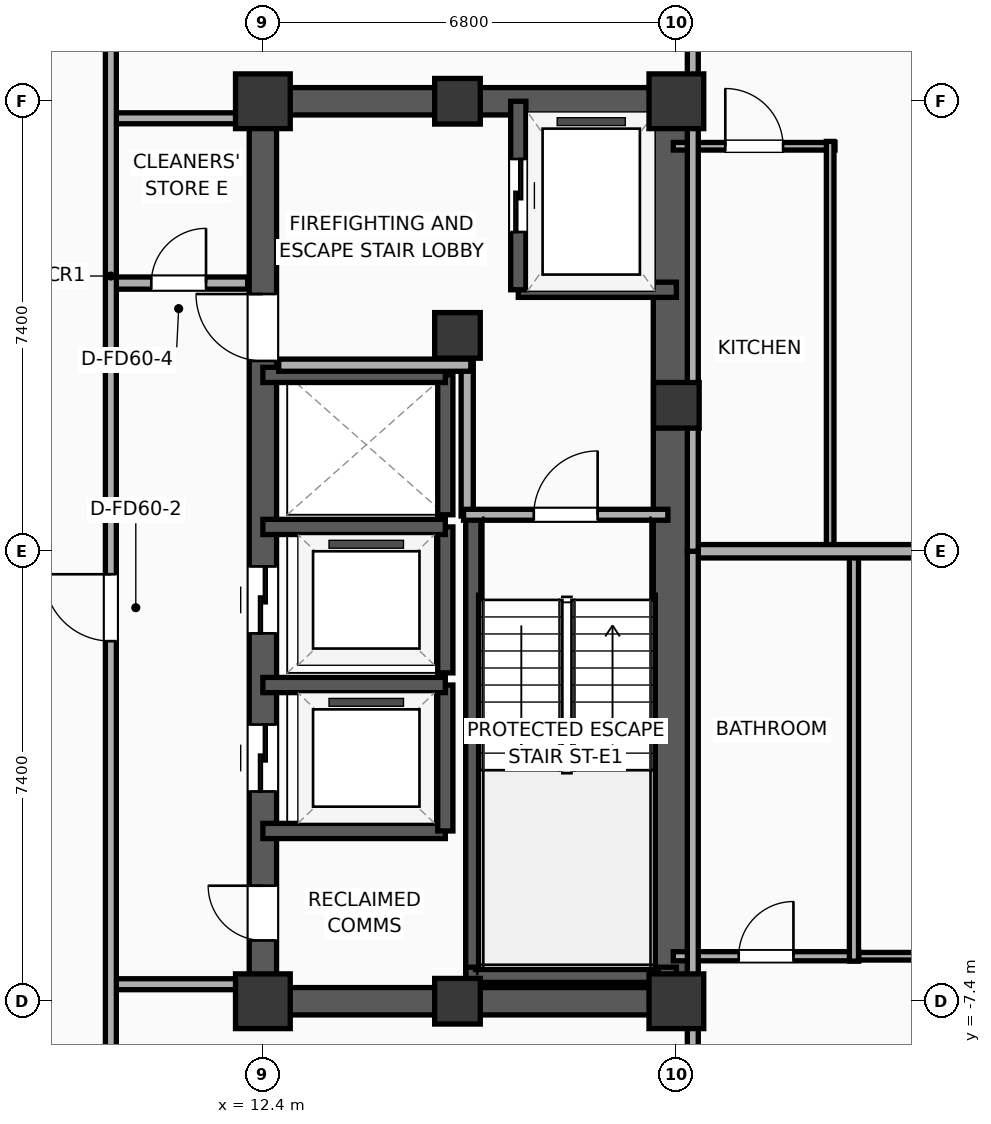
"""IFC4 building model, lengths in metres.
Left out: names, types, materials, properties, quantities, classifications, styles, units other than length and angle.
Written with IfcOpenShell. Run it as: python <this file> out.ifc"""

import sys

from ifc_helpers import new_model, si_unit, direction, frame, frame_2d, origin, origin_2d, place, context, subcontext, project, spatial, rectangle, extrude, element, fill, save


model = new_model("IFC4")
c1 = context("Model", 3, precision=1e-05, world=origin(), true_north=direction((0.0, 1.0)))
c2 = subcontext(c1, "Body", "Model", "MODEL_VIEW")
j1 = project(units=[si_unit("LENGTHUNIT", "METRE"), si_unit("PLANEANGLEUNIT", "RADIAN")], contexts=[c1])
p1 = place(None, origin())
s1 = spatial("IfcSite", under=j1, at=p1, CompositionType="ELEMENT")
p2 = place(p1, origin())
s2 = spatial("IfcBuilding", under=s1, at=p2, CompositionType="ELEMENT")
p3 = place(p2, frame((0.0, 0.0, 148.2)))
s3 = spatial("IfcBuildingStorey", under=s2, at=p3, CompositionType="ELEMENT", Elevation=148.2)
p4 = place(p3, frame((12.4, -7.4, 0.0), z_axis=(0.0, 0.0, 1.0), x_axis=(1.0, 0.0, 0.0)))
e1 = element("IfcColumn", 1, at=p4, inside=s3, PredefinedType="COLUMN", context=c2, shape_type="SweptSolid", body=[
    extrude(rectangle(XDim=0.9, YDim=0.9, at=origin_2d()), origin(), (0.0, 0.0, 1.0), 3.9),
])
p5 = place(p3, frame((15.6, 3.55, 0.0), z_axis=(0.0, 0.0, 1.0), x_axis=(1.0, 0.0, 0.0)))
e2 = element("IfcColumn", 2, at=p5, inside=s3, PredefinedType="COLUMN", context=c2, shape_type="SweptSolid", body=[
    extrude(rectangle(XDim=0.75, YDim=0.75, at=origin_2d()), origin(), (0.0, 0.0, 1.0), 3.9),
])
p6 = place(p3, frame((12.4, 7.4, 0.0), z_axis=(0.0, 0.0, 1.0), x_axis=(1.0, 0.0, 0.0)))
e3 = element("IfcColumn", 3, at=p6, inside=s3, PredefinedType="COLUMN", context=c2, shape_type="SweptSolid", body=[
    extrude(rectangle(XDim=0.9, YDim=0.9, at=origin_2d()), origin(), (0.0, 0.0, 1.0), 3.9),
])
for number, where, z_axis, x_axis in (
    (4, (15.6, -7.4, 0.0), (0.0, 0.0, 1.0), (1.0, 0.0, 0.0)),
    (5, (15.6, 7.4, 0.0), (0.0, 0.0, 1.0), (1.0, 0.0, 0.0)),
):
    element("IfcColumn", number, at=place(p3, frame(where, z_axis=z_axis, x_axis=x_axis)), inside=s3, PredefinedType="COLUMN", context=c2, shape_type="SweptSolid", body=[
        extrude(rectangle(XDim=0.75, YDim=0.75, at=origin_2d()), origin(), (0.0, 0.0, 1.0), 3.9),
    ])
p7 = place(p3, frame((19.2, -7.4, 0.0), z_axis=(0.0, 0.0, 1.0), x_axis=(1.0, 0.0, 0.0)))
e6 = element("IfcColumn", 6, at=p7, inside=s3, PredefinedType="COLUMN", context=c2, shape_type="SweptSolid", body=[
    extrude(rectangle(XDim=0.9, YDim=0.9, at=origin_2d()), origin(), (0.0, 0.0, 1.0), 3.9),
])
p8 = place(p3, frame((19.2, 2.4, 0.0), z_axis=(0.0, 0.0, 1.0), x_axis=(1.0, 0.0, 0.0)))
e7 = element("IfcColumn", 7, at=p8, inside=s3, PredefinedType="COLUMN", context=c2, shape_type="SweptSolid", body=[
    extrude(rectangle(XDim=0.75, YDim=0.75, at=origin_2d()), origin(), (0.0, 0.0, 1.0), 3.9),
])
p9 = place(p3, frame((19.2, 7.4, 0.0), z_axis=(0.0, 0.0, 1.0), x_axis=(1.0, 0.0, 0.0)))
e8 = element("IfcColumn", 8, at=p9, inside=s3, PredefinedType="COLUMN", context=c2, shape_type="SweptSolid", body=[
    extrude(rectangle(XDim=0.9, YDim=0.9, at=origin_2d()), origin(), (0.0, 0.0, 1.0), 3.9),
])
for number, where, z_axis, x_axis in (
    (9, (12.175, -7.4, 0.0), (0.0, 0.0, 1.0), (1.0, 0.0, 0.0)),
    (10, (12.175, 7.4, 0.0), (0.0, 0.0, 1.0), (1.0, 0.0, 0.0)),
):
    element("IfcWall", number, at=place(p3, frame(where, z_axis=z_axis, x_axis=x_axis)), inside=s3, PredefinedType="SHEAR", context=c2, shape_type="SweptSolid", body=[
        extrude(rectangle(XDim=7.25, YDim=0.45, at=frame_2d((3.625, 0.0))), origin(), (0.0, 0.0, 1.0), 3.65),
    ])
p10 = place(p3, frame((12.4, -7.4, 0.0), z_axis=(0.0, 0.0, 1.0), x_axis=(0.0, 1.0, 0.0)))
e11 = element("IfcWall", 11, at=p10, inside=s3, PredefinedType="SHEAR", context=c2, shape_type="SweptSolid", body=[
    extrude(rectangle(XDim=14.8, YDim=0.45, at=frame_2d((7.4, 0.0))), origin(), (0.0, 0.0, 1.0), 3.65),
])
p11 = place(p10, frame((3.45, 0.0, 0.0)))
e12 = element("IfcOpeningElement", 12, at=p11, cuts=e11, PredefinedType="OPENING", context=c2, shape_type="SweptSolid", body=[
    extrude(rectangle(XDim=1.1, YDim=2.05, at=frame_2d((0.55, 1.025))), frame((0.0, 0.235, 0.0), z_axis=(0.0, -1.0, 0.0), x_axis=(1.0, 0.0, 0.0)), (0.0, 0.0, 1.0), 0.47),
])
p12 = place(p10, frame((6.05, 0.0, 0.0)))
e13 = element("IfcOpeningElement", 13, at=p12, cuts=e11, PredefinedType="OPENING", context=c2, shape_type="SweptSolid", body=[
    extrude(rectangle(XDim=1.1, YDim=2.05, at=frame_2d((0.55, 1.025))), frame((0.0, 0.235, 0.0), z_axis=(0.0, -1.0, 0.0), x_axis=(1.0, 0.0, 0.0)), (0.0, 0.0, 1.0), 0.47),
])
p13 = place(p10, frame((10.53, 0.0, 0.0)))
e14 = element("IfcOpeningElement", 14, at=p13, cuts=e11, PredefinedType="OPENING", context=c2, shape_type="SweptSolid", body=[
    extrude(rectangle(XDim=1.1, YDim=2.05, at=frame_2d((0.55, 1.025))), frame((0.0, 0.235, 0.0), z_axis=(0.0, -1.0, 0.0), x_axis=(1.0, 0.0, 0.0)), (0.0, 0.0, 1.0), 0.47),
])
p14 = place(p10, frame((1.0, 0.0, 0.0)))
e15 = element("IfcOpeningElement", 15, at=p14, cuts=e11, PredefinedType="OPENING", context=c2, shape_type="SweptSolid", body=[
    extrude(rectangle(XDim=0.9, YDim=2.05, at=frame_2d((0.45, 1.025))), frame((0.0, 0.235, 0.0), z_axis=(0.0, -1.0, 0.0), x_axis=(1.0, 0.0, 0.0)), (0.0, 0.0, 1.0), 0.47),
])
p15 = place(p3, frame((19.145, -7.4, 0.0), z_axis=(0.0, 0.0, 1.0), x_axis=(0.0, 1.0, 0.0)))
e16 = element("IfcWall", 16, at=p15, inside=s3, PredefinedType="SHEAR", context=c2, shape_type="SweptSolid", body=[
    extrude(rectangle(XDim=14.8, YDim=0.65, at=frame_2d((7.4, 0.0))), origin(), (0.0, 0.0, 1.0), 3.65),
])
p16 = place(p3, frame((15.86, -7.085, 0.0), z_axis=(0.0, 0.0, 1.0), x_axis=(0.0, 1.0, 0.0)))
e17 = element("IfcWall", 17, at=p16, inside=s3, PredefinedType="SOLIDWALL", context=c2, shape_type="SweptSolid", body=[
    extrude(rectangle(XDim=7.685, YDim=0.25, at=frame_2d((3.843, 0.0))), origin(), (0.0, 0.0, 1.0), 3.65),
])
p17 = place(p3, frame((15.74, -6.965, 0.0), z_axis=(0.0, 0.0, 1.0), x_axis=(1.0, 0.0, 0.0)))
e18 = element("IfcWall", 18, at=p17, inside=s3, PredefinedType="SOLIDWALL", context=c2, shape_type="SweptSolid", body=[
    extrude(rectangle(XDim=3.46, YDim=0.25, at=frame_2d((1.73, 0.0))), origin(), (0.0, 0.0, 1.0), 3.65),
])
p18 = place(p3, frame((16.6, 4.3, 0.0), z_axis=(0.0, 0.0, 1.0), x_axis=(1.0, 0.0, 0.0)))
e19 = element("IfcWall", 19, at=p18, inside=s3, PredefinedType="SOLIDWALL", context=c2, shape_type="SweptSolid", body=[
    extrude(rectangle(XDim=2.6, YDim=0.25, at=frame_2d((1.3, 0.0))), origin(), (0.0, 0.0, 1.0), 3.65),
])
p19 = place(p3, frame((16.6, 7.4, 0.0), z_axis=(0.0, 0.0, 1.0), x_axis=(0.0, -1.0, 0.0)))
e20 = element("IfcWall", 20, at=p19, inside=s3, PredefinedType="SOLIDWALL", context=c2, shape_type="SweptSolid", body=[
    extrude(rectangle(XDim=3.1, YDim=0.25, at=frame_2d((1.55, 0.0))), origin(), (0.0, 0.0, 1.0), 3.65),
])
p20 = place(p19, frame((0.95, 0.0, 0.0)))
e21 = element("IfcOpeningElement", 21, at=p20, cuts=e20, PredefinedType="OPENING", context=c2, shape_type="SweptSolid", body=[
    extrude(rectangle(XDim=1.2, YDim=2.05, at=frame_2d((0.6, 1.025))), frame((0.0, 0.135, 0.0), z_axis=(0.0, -1.0, 0.0), x_axis=(1.0, 0.0, 0.0)), (0.0, 0.0, 1.0), 0.27),
])
p21 = place(p3, frame((12.4, -4.6, 0.0), z_axis=(0.0, 0.0, 1.0), x_axis=(1.0, 0.0, 0.0)))
e22 = element("IfcWall", 22, at=p21, inside=s3, PredefinedType="SOLIDWALL", context=c2, shape_type="SweptSolid", body=[
    extrude(rectangle(XDim=3.0, YDim=0.25, at=frame_2d((1.5, 0.0))), origin(), (0.0, 0.0, 1.0), 3.65),
])
p22 = place(p3, frame((15.4, -4.6, 0.0), z_axis=(0.0, 0.0, 1.0), x_axis=(0.0, 1.0, 0.0)))
e23 = element("IfcWall", 23, at=p22, inside=s3, PredefinedType="SOLIDWALL", context=c2, shape_type="SweptSolid", body=[
    extrude(rectangle(XDim=2.4, YDim=0.25, at=frame_2d((1.2, 0.0))), origin(), (0.0, 0.0, 1.0), 3.65),
])
p23 = place(p3, frame((15.4, -2.2, 0.0), z_axis=(0.0, 0.0, 1.0), x_axis=(-1.0, 0.0, 0.0)))
e24 = element("IfcWall", 24, at=p23, inside=s3, PredefinedType="SOLIDWALL", context=c2, shape_type="SweptSolid", body=[
    extrude(rectangle(XDim=3.0, YDim=0.25, at=frame_2d((1.5, 0.0))), origin(), (0.0, 0.0, 1.0), 3.65),
])
p24 = place(p3, frame((15.4, -2.0, 0.0), z_axis=(0.0, 0.0, 1.0), x_axis=(0.0, 1.0, 0.0)))
e25 = element("IfcWall", 25, at=p24, inside=s3, PredefinedType="SOLIDWALL", context=c2, shape_type="SweptSolid", body=[
    extrude(rectangle(XDim=2.4, YDim=0.25, at=frame_2d((1.2, 0.0))), origin(), (0.0, 0.0, 1.0), 3.65),
])
p25 = place(p3, frame((15.4, 0.4, 0.0), z_axis=(0.0, 0.0, 1.0), x_axis=(-1.0, 0.0, 0.0)))
e26 = element("IfcWall", 26, at=p25, inside=s3, PredefinedType="SOLIDWALL", context=c2, shape_type="SweptSolid", body=[
    extrude(rectangle(XDim=3.0, YDim=0.25, at=frame_2d((1.5, 0.0))), origin(), (0.0, 0.0, 1.0), 3.65),
])
p26 = place(p3, frame((15.4, 0.6, 0.0), z_axis=(0.0, 0.0, 1.0), x_axis=(0.0, 1.0, 0.0)))
e27 = element("IfcWall", 27, at=p26, inside=s3, PredefinedType="SOLIDWALL", context=c2, shape_type="SweptSolid", body=[
    extrude(rectangle(XDim=2.3, YDim=0.25, at=frame_2d((1.15, 0.0))), origin(), (0.0, 0.0, 1.0), 3.65),
])
p27 = place(p3, frame((15.4, 2.9, 0.0), z_axis=(0.0, 0.0, 1.0), x_axis=(-1.0, 0.0, 0.0)))
e28 = element("IfcWall", 28, at=p27, inside=s3, PredefinedType="SOLIDWALL", context=c2, shape_type="SweptSolid", body=[
    extrude(rectangle(XDim=3.0, YDim=0.25, at=frame_2d((1.5, 0.0))), origin(), (0.0, 0.0, 1.0), 3.65),
])
p28 = place(p3, frame((15.76, 0.58, 0.0), z_axis=(0.0, 0.0, 1.0), x_axis=(0.0, 1.0, 0.0)))
e29 = element("IfcWall", 29, at=p28, inside=s3, PredefinedType="PARTITIONING", context=c2, shape_type="SweptSolid", body=[
    extrude(rectangle(XDim=2.52, YDim=0.2, at=frame_2d((1.26, 0.0))), origin(), (0.0, 0.0, 1.0), 3.65),
])
p29 = place(p3, frame((12.66, 3.06, 0.0), z_axis=(0.0, 0.0, 1.0), x_axis=(1.0, 0.0, 0.0)))
e30 = element("IfcWall", 30, at=p29, inside=s3, PredefinedType="PARTITIONING", context=c2, shape_type="SweptSolid", body=[
    extrude(rectangle(XDim=3.16, YDim=0.2, at=frame_2d((1.58, 0.0))), origin(), (0.0, 0.0, 1.0), 3.65),
])
p30 = place(p3, frame((15.7, 0.6, 0.0), z_axis=(0.0, 0.0, 1.0), x_axis=(1.0, 0.0, 0.0)))
e31 = element("IfcWall", 31, at=p30, inside=s3, PredefinedType="PARTITIONING", context=c2, shape_type="SweptSolid", body=[
    extrude(rectangle(XDim=3.36, YDim=0.18, at=frame_2d((1.68, 0.0))), origin(), (0.0, 0.0, 1.0), 3.65),
])
p31 = place(p30, frame((1.155, 0.0, 0.0)))
e32 = element("IfcOpeningElement", 32, at=p31, cuts=e31, PredefinedType="OPENING", context=c2, shape_type="SweptSolid", body=[
    extrude(rectangle(XDim=1.05, YDim=2.05, at=frame_2d((0.525, 1.025))), frame((0.0, 0.1, 0.0), z_axis=(0.0, -1.0, 0.0), x_axis=(1.0, 0.0, 0.0)), (0.0, 0.0, 1.0), 0.2),
])
p32 = place(p3, frame((9.88, 4.41, 0.0), z_axis=(0.0, 0.0, 1.0), x_axis=(1.0, 0.0, 0.0)))
e33 = element("IfcWall", 33, at=p32, inside=s3, PredefinedType="PARTITIONING", context=c2, shape_type="SweptSolid", body=[
    extrude(rectangle(XDim=2.27, YDim=0.2, at=frame_2d((1.135, 0.0))), origin(), (0.0, 0.0, 1.0), 3.65),
])
p33 = place(p32, frame((0.685, 0.0, 0.0)))
e34 = element("IfcOpeningElement", 34, at=p33, cuts=e33, PredefinedType="OPENING", context=c2, shape_type="SweptSolid", body=[
    extrude(rectangle(XDim=0.9, YDim=2.05, at=frame_2d((0.45, 1.025))), frame((0.0, 0.11, 0.0), z_axis=(0.0, -1.0, 0.0), x_axis=(1.0, 0.0, 0.0)), (0.0, 0.0, 1.0), 0.22),
])
for number, where, z_axis, x_axis in (
    (35, (9.88, 7.12, 0.0), (0.0, 0.0, 1.0), (1.0, 0.0, 0.0)),
    (36, (9.88, -7.12, 0.0), (0.0, 0.0, 1.0), (1.0, 0.0, 0.0)),
):
    element("IfcWall", number, at=place(p3, frame(where, z_axis=z_axis, x_axis=x_axis)), inside=s3, PredefinedType="PARTITIONING", context=c2, shape_type="SweptSolid", body=[
        extrude(rectangle(XDim=2.27, YDim=0.18, at=frame_2d((1.135, 0.0))), origin(), (0.0, 0.0, 1.0), 3.65),
    ])
p34 = place(p3, frame((9.9, -9.28, 0.0), z_axis=(0.0, 0.0, 1.0), x_axis=(0.0, 1.0, 0.0)))
e37 = element("IfcWall", 37, at=p34, inside=s3, PredefinedType="PARTITIONING", context=c2, shape_type="SweptSolid", body=[
    extrude(rectangle(XDim=18.56, YDim=0.18, at=frame_2d((9.28, 0.0))), origin(), (0.0, 0.0, 1.0), 3.65),
])
p35 = place(p34, frame((7.802, 0.0, 0.0)))
e38 = element("IfcOpeningElement", 38, at=p35, cuts=e37, PredefinedType="OPENING", context=c2, shape_type="SweptSolid", body=[
    extrude(rectangle(XDim=1.1, YDim=2.05, at=frame_2d((0.55, 1.025))), frame((0.0, 0.1, 0.0), z_axis=(0.0, -1.0, 0.0), x_axis=(1.0, 0.0, 0.0)), (0.0, 0.0, 1.0), 0.2),
])
p36 = place(p3, frame((22.06, -6.66, 0.0), z_axis=(0.0, 0.0, 1.0), x_axis=(1.0, 0.0, 0.0)))
e39 = element("IfcWall", 39, at=p36, inside=s3, PredefinedType="PARTITIONING", context=c2, shape_type="SweptSolid", body=[
    extrude(rectangle(XDim=5.321, YDim=0.125, at=frame_2d((2.661, 0.0))), origin(), (0.0, 0.0, 1.0), 3.65),
])
p37 = place(p36, frame((1.945, 0.0, 0.0)))
e40 = element("IfcOpeningElement", 40, at=p37, cuts=e39, PredefinedType="OPENING", context=c2, shape_type="SweptSolid", body=[
    extrude(rectangle(XDim=0.9, YDim=2.05, at=frame_2d((0.45, 1.025))), frame((0.0, 0.073, 0.0), z_axis=(0.0, -1.0, 0.0), x_axis=(1.0, 0.0, 0.0)), (0.0, 0.0, 1.0), 0.145),
])
p38 = place(p3, frame((19.15, -6.66, 0.0), z_axis=(0.0, 0.0, 1.0), x_axis=(1.0, 0.0, 0.0)))
e41 = element("IfcWall", 41, at=p38, inside=s3, PredefinedType="PLUMBINGWALL", context=c2, shape_type="SweptSolid", body=[
    extrude(rectangle(XDim=3.05, YDim=0.15, at=frame_2d((1.525, 0.0))), origin(), (0.0, 0.0, 1.0), 3.04),
])
p39 = place(p38, frame((1.075, 0.0, 0.0)))
e42 = element("IfcOpeningElement", 42, at=p39, cuts=e41, PredefinedType="OPENING", context=c2, shape_type="SweptSolid", body=[
    extrude(rectangle(XDim=0.9, YDim=2.05, at=frame_2d((0.45, 1.025))), frame((0.0, 0.085, 0.0), z_axis=(0.0, -1.0, 0.0), x_axis=(1.0, 0.0, 0.0)), (0.0, 0.0, 1.0), 0.17),
])
p40 = place(p3, frame((22.12, -6.74, 0.0), z_axis=(0.0, 0.0, 1.0), x_axis=(0.0, 1.0, 0.0)))
e43 = element("IfcWall", 43, at=p40, inside=s3, PredefinedType="PLUMBINGWALL", context=c2, shape_type="SweptSolid", body=[
    extrude(rectangle(XDim=6.72, YDim=0.15, at=frame_2d((3.36, 0.0))), origin(), (0.0, 0.0, 1.0), 3.65),
])
p41 = place(p3, frame((19.15, 6.66, 0.0), z_axis=(0.0, 0.0, 1.0), x_axis=(1.0, 0.0, 0.0)))
e44 = element("IfcWall", 44, at=p41, inside=s3, PredefinedType="PARTITIONING", context=c2, shape_type="SweptSolid", body=[
    extrude(rectangle(XDim=2.659, YDim=0.125, at=frame_2d((1.33, 0.0))), origin(), (0.0, 0.0, 1.0), 3.65),
])
p42 = place(p41, frame((0.854, 0.0, 0.0)))
e45 = element("IfcOpeningElement", 45, at=p42, cuts=e44, PredefinedType="OPENING", context=c2, shape_type="SweptSolid", body=[
    extrude(rectangle(XDim=0.95, YDim=2.05, at=frame_2d((0.475, 1.025))), frame((0.0, 0.073, 0.0), z_axis=(0.0, -1.0, 0.0), x_axis=(1.0, 0.0, 0.0)), (0.0, 0.0, 1.0), 0.145),
])
p43 = place(p3, frame((21.729, 0.02, 0.0), z_axis=(0.0, 0.0, 1.0), x_axis=(0.0, 1.0, 0.0)))
e46 = element("IfcWall", 46, at=p43, inside=s3, PredefinedType="PARTITIONING", context=c2, shape_type="SweptSolid", body=[
    extrude(rectangle(XDim=6.72, YDim=0.125, at=frame_2d((3.36, 0.0))), origin(), (0.0, 0.0, 1.0), 3.65),
])
p44 = place(p3, frame((19.47, 0.0, 0.0), z_axis=(0.0, 0.0, 1.0), x_axis=(1.0, 0.0, 0.0)))
e47 = element("IfcWall", 47, at=p44, inside=s3, PredefinedType="PARTITIONING", context=c2, shape_type="SweptSolid", body=[
    extrude(rectangle(XDim=7.06, YDim=0.22, at=frame_2d((3.53, 0.0))), origin(), (0.0, 0.0, 1.0), 3.65),
])
p45 = place(p3, frame((19.47, -18.559, 0.0), z_axis=(0.0, 0.0, 1.0), x_axis=(0.0, 1.0, 0.0)))
e48 = element("IfcWall", 48, at=p45, inside=s3, PredefinedType="PARTITIONING", context=c2, shape_type="SweptSolid", body=[
    extrude(rectangle(XDim=18.559, YDim=0.18, at=frame_2d((9.279, 0.0))), origin(), (0.0, 0.0, 1.0), 3.65),
])
p46 = place(p45, frame((8.178, 0.0, 0.0)))
e49 = element("IfcOpeningElement", 49, at=p46, cuts=e48, PredefinedType="OPENING", context=c2, shape_type="SweptSolid", body=[
    extrude(rectangle(XDim=0.9, YDim=2.05, at=frame_2d((0.45, 1.025))), frame((0.0, 0.1, 0.0), z_axis=(0.0, -1.0, 0.0), x_axis=(1.0, 0.0, 0.0)), (0.0, 0.0, 1.0), 0.2),
])
p47 = place(p3, frame((19.47, 0.0, 0.0), z_axis=(0.0, 0.0, 1.0), x_axis=(0.0, 1.0, 0.0)))
e50 = element("IfcWall", 50, at=p47, inside=s3, PredefinedType="PARTITIONING", context=c2, shape_type="SweptSolid", body=[
    extrude(rectangle(XDim=22.124, YDim=0.18, at=frame_2d((11.062, 0.0))), origin(), (0.0, 0.0, 1.0), 3.04),
])
p48 = place(p47, frame((9.479, 0.0, 0.0)))
e51 = element("IfcOpeningElement", 51, at=p48, cuts=e50, PredefinedType="OPENING", context=c2, shape_type="SweptSolid", body=[
    extrude(rectangle(XDim=0.9, YDim=2.05, at=frame_2d((0.45, 1.025))), frame((0.0, 0.1, 0.0), z_axis=(0.0, -1.0, 0.0), x_axis=(1.0, 0.0, 0.0)), (0.0, 0.0, 1.0), 0.2),
])
p49 = place(p20, origin())
e52 = element("IfcDoor", 52, at=p49, inside=s3, OperationType="SLIDING_TO_LEFT", PredefinedType="DOOR", context=c2, shape_type="SweptSolid", body=[
    extrude(rectangle(XDim=1.2, YDim=2.05, at=frame_2d((0.6, 1.025))), frame((0.0, 0.025, 0.0), z_axis=(0.0, -1.0, 0.0), x_axis=(1.0, 0.0, 0.0)), (0.0, 0.0, 1.0), 0.05),
])
fill(e21, e52)
p50 = place(p11, origin())
e53 = element("IfcDoor", 53, at=p50, inside=s3, OperationType="SLIDING_TO_LEFT", PredefinedType="DOOR", context=c2, shape_type="SweptSolid", body=[
    extrude(rectangle(XDim=1.1, YDim=2.05, at=frame_2d((0.55, 1.025))), frame((0.0, 0.025, 0.0), z_axis=(0.0, -1.0, 0.0), x_axis=(1.0, 0.0, 0.0)), (0.0, 0.0, 1.0), 0.05),
])
fill(e12, e53)
p51 = place(p12, origin())
e54 = element("IfcDoor", 54, at=p51, inside=s3, OperationType="SLIDING_TO_LEFT", PredefinedType="DOOR", context=c2, shape_type="SweptSolid", body=[
    extrude(rectangle(XDim=1.1, YDim=2.05, at=frame_2d((0.55, 1.025))), frame((0.0, 0.025, 0.0), z_axis=(0.0, -1.0, 0.0), x_axis=(1.0, 0.0, 0.0)), (0.0, 0.0, 1.0), 0.05),
])
fill(e13, e54)
p52 = place(p31, origin())
e55 = element("IfcDoor", 55, at=p52, inside=s3, OperationType="SINGLE_SWING_RIGHT", PredefinedType="DOOR", context=c2, shape_type="SweptSolid", body=[
    extrude(rectangle(XDim=1.05, YDim=2.05, at=frame_2d((0.525, 1.025))), frame((0.0, 0.025, 0.0), z_axis=(0.0, -1.0, 0.0), x_axis=(1.0, 0.0, 0.0)), (0.0, 0.0, 1.0), 0.05),
])
fill(e32, e55)
p53 = place(p33, origin())
e56 = element("IfcDoor", 56, at=p53, inside=s3, OperationType="SINGLE_SWING_RIGHT", PredefinedType="DOOR", context=c2, shape_type="SweptSolid", body=[
    extrude(rectangle(XDim=0.9, YDim=2.05, at=frame_2d((0.45, 1.025))), frame((0.0, 0.025, 0.0), z_axis=(0.0, -1.0, 0.0), x_axis=(1.0, 0.0, 0.0)), (0.0, 0.0, 1.0), 0.05),
])
fill(e34, e56)
p54 = place(p35, origin())
e57 = element("IfcDoor", 57, at=p54, inside=s3, OperationType="SINGLE_SWING_RIGHT", PredefinedType="DOOR", context=c2, shape_type="SweptSolid", body=[
    extrude(rectangle(XDim=1.1, YDim=2.05, at=frame_2d((0.55, 1.025))), frame((0.0, 0.025, 0.0), z_axis=(0.0, -1.0, 0.0), x_axis=(1.0, 0.0, 0.0)), (0.0, 0.0, 1.0), 0.05),
])
fill(e38, e57)
p55 = place(p39, origin())
e58 = element("IfcDoor", 58, at=p55, inside=s3, OperationType="SINGLE_SWING_RIGHT", PredefinedType="DOOR", context=c2, shape_type="SweptSolid", body=[
    extrude(rectangle(XDim=0.9, YDim=2.05, at=frame_2d((0.45, 1.025))), frame((0.0, 0.025, 0.0), z_axis=(0.0, -1.0, 0.0), x_axis=(1.0, 0.0, 0.0)), (0.0, 0.0, 1.0), 0.05),
])
fill(e42, e58)
p56 = place(p42, origin())
e59 = element("IfcDoor", 59, at=p56, inside=s3, OperationType="SINGLE_SWING_LEFT", PredefinedType="DOOR", context=c2, shape_type="SweptSolid", body=[
    extrude(rectangle(XDim=0.95, YDim=2.05, at=frame_2d((0.475, 1.025))), frame((0.0, 0.025, 0.0), z_axis=(0.0, -1.0, 0.0), x_axis=(1.0, 0.0, 0.0)), (0.0, 0.0, 1.0), 0.05),
])
fill(e45, e59)
p57 = place(p13, origin())
e60 = element("IfcDoor", 60, at=p57, inside=s3, OperationType="SINGLE_SWING_RIGHT", PredefinedType="DOOR", context=c2, shape_type="SweptSolid", body=[
    extrude(rectangle(XDim=1.1, YDim=2.05, at=frame_2d((0.55, 1.025))), frame((0.0, 0.025, 0.0), z_axis=(0.0, -1.0, 0.0), x_axis=(1.0, 0.0, 0.0)), (0.0, 0.0, 1.0), 0.05),
])
fill(e14, e60)
p58 = place(p14, origin())
e61 = element("IfcDoor", 61, at=p58, inside=s3, OperationType="SINGLE_SWING_RIGHT", PredefinedType="DOOR", context=c2, shape_type="SweptSolid", body=[
    extrude(rectangle(XDim=0.9, YDim=2.05, at=frame_2d((0.45, 1.025))), frame((0.0, 0.025, 0.0), z_axis=(0.0, -1.0, 0.0), x_axis=(1.0, 0.0, 0.0)), (0.0, 0.0, 1.0), 0.05),
])
fill(e15, e61)
save(model, sys.argv[1])
